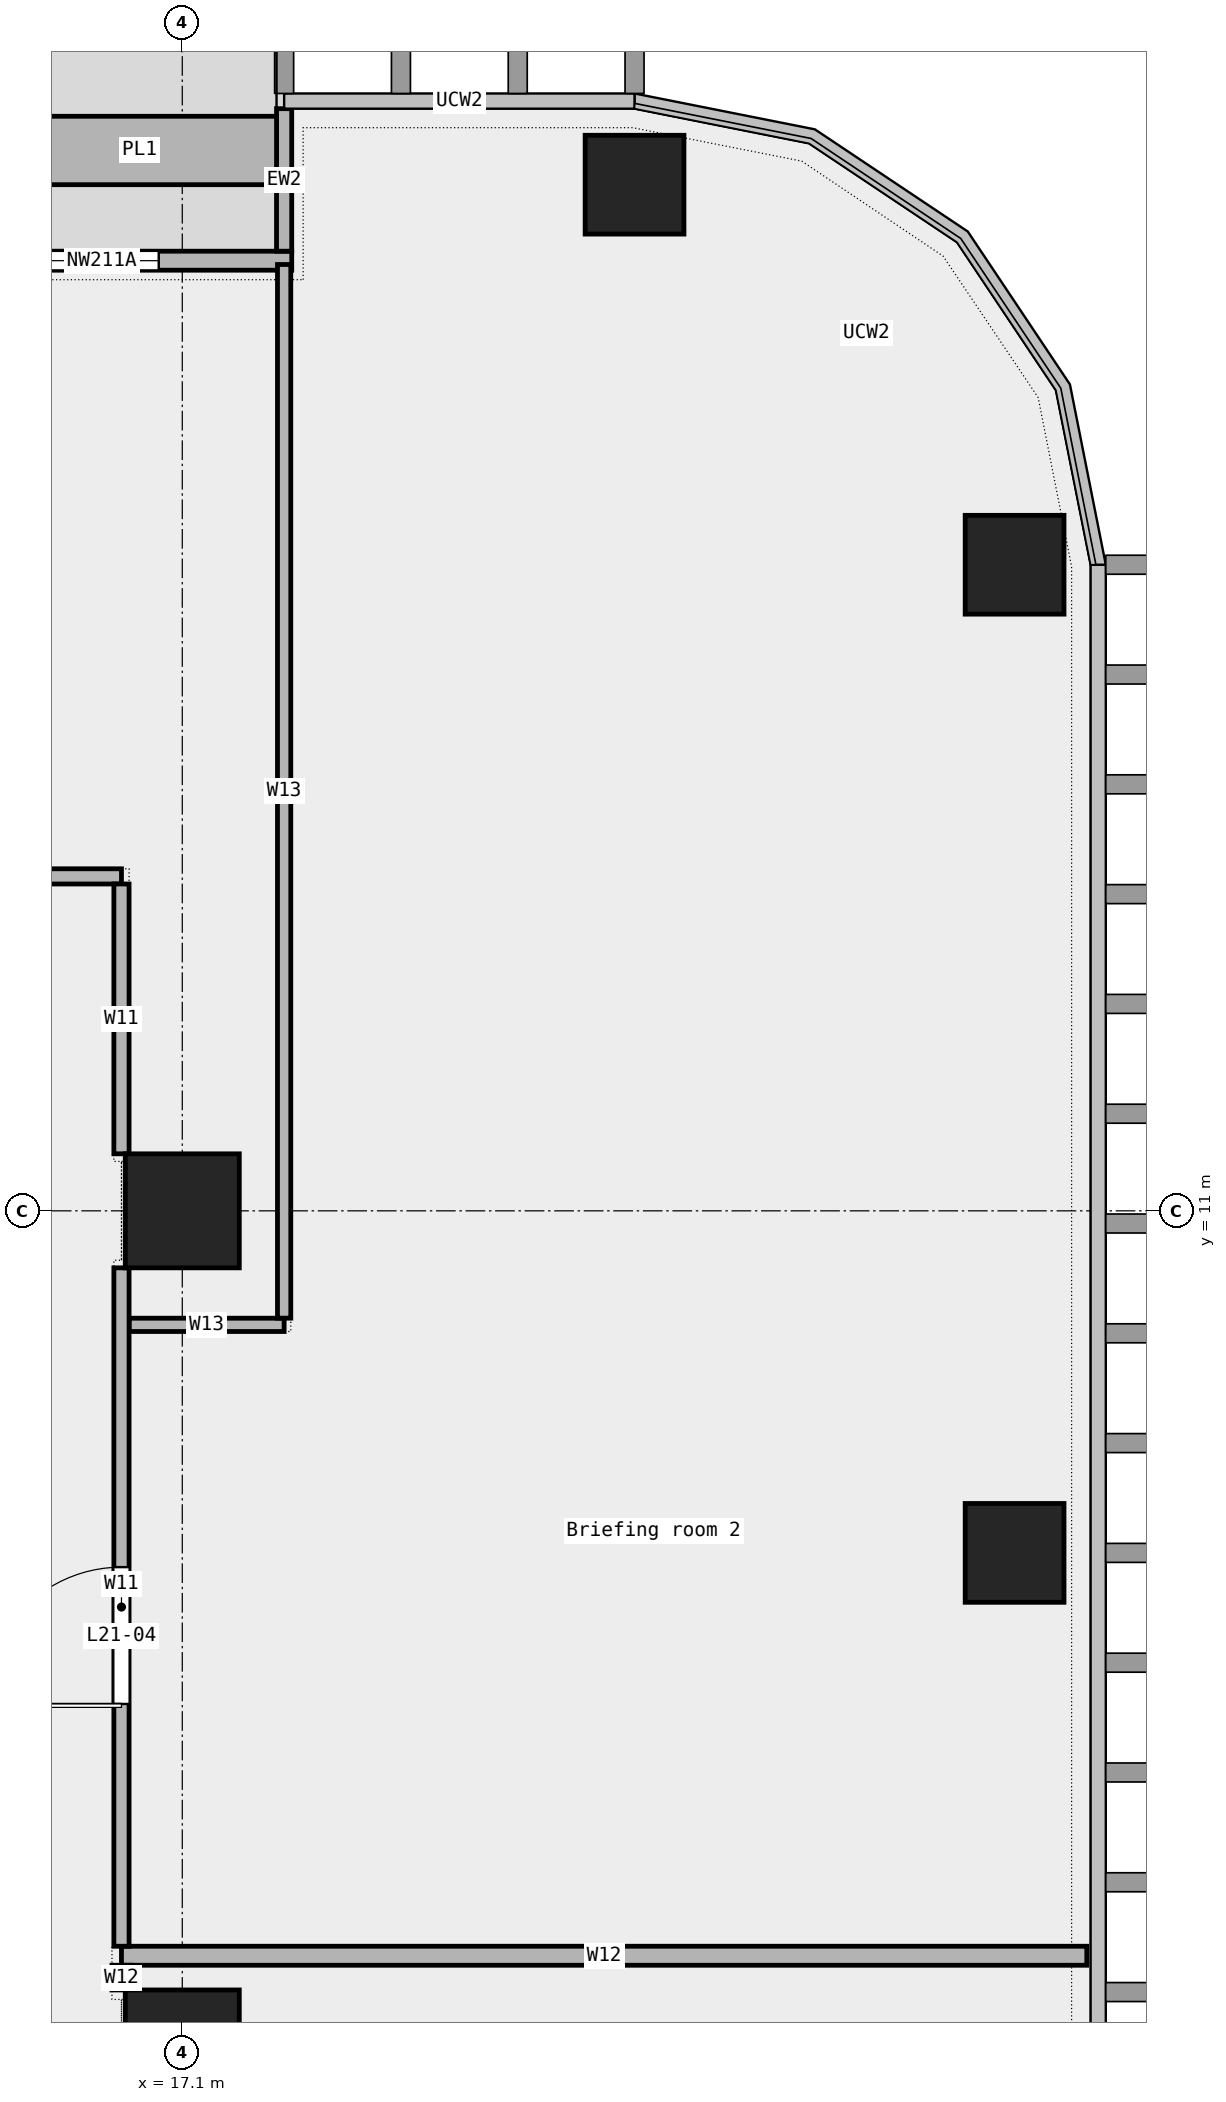
"""IFC4 building model, lengths in metres.
Left out: names, types, materials, properties, quantities, classifications, styles, units other than length and angle.
Written with IfcOpenShell. Run it as: python <this file> out.ifc"""

import sys

from ifc_helpers import new_model, si_unit, direction, frame, frame_2d, origin, origin_2d, place, context, subcontext, project, spatial, rectangle, extrude, element, fill, save


model = new_model("IFC4")
c1 = context("Model", 3, precision=1e-05, world=origin(), true_north=direction((0.0, 1.0)))
c2 = subcontext(c1, "Body", "Model", "MODEL_VIEW")
j1 = project(units=[si_unit("LENGTHUNIT", "METRE"), si_unit("PLANEANGLEUNIT", "RADIAN")], contexts=[c1])
p1 = place(None, origin())
s1 = spatial("IfcSite", under=j1, at=p1, CompositionType="ELEMENT")
p2 = place(p1, origin())
s2 = spatial("IfcBuilding", under=s1, at=p2, CompositionType="ELEMENT")
p3 = place(p2, frame((0.0, 0.0, 108.1)))
s3 = spatial("IfcBuildingStorey", under=s2, at=p3, CompositionType="ELEMENT", Elevation=108.1)
for number, where, z_axis, x_axis in (
    (1, (28.05, 6.5, 0.0), (0.0, 0.0, 1.0), (1.0, 0.0, 0.0)),
    (2, (28.05, 19.5, 0.0), (0.0, 0.0, 1.0), (1.0, 0.0, 0.0)),
    (3, (23.05, 24.5, 0.0), (0.0, 0.0, 1.0), (1.0, 0.0, 0.0)),
):
    element("IfcColumn", number, at=place(p3, frame(where, z_axis=z_axis, x_axis=x_axis)), inside=s3, PredefinedType="COLUMN", context=c2, shape_type="SweptSolid", body=[
        extrude(rectangle(XDim=1.3, YDim=1.3, at=origin_2d()), origin(), (0.0, 0.0, 1.0), 4.05),
    ])
for number, where, z_axis, x_axis in (
    (4, (17.1, 0.0, 0.0), (0.0, 0.0, 1.0), (1.0, 0.0, 0.0)),
    (5, (17.1, 11.0, 0.0), (0.0, 0.0, 1.0), (1.0, 0.0, 0.0)),
):
    element("IfcColumn", number, at=place(p3, frame(where, z_axis=z_axis, x_axis=x_axis)), inside=s3, PredefinedType="COLUMN", context=c2, shape_type="SweptSolid", body=[
        extrude(rectangle(XDim=1.5, YDim=1.5, at=origin_2d()), origin(), (0.0, 0.0, 1.0), 4.05),
    ])
p4 = place(p3, frame((18.54, 23.5, 0.0), z_axis=(0.0, 0.0, 1.0), x_axis=(-1.0, 0.0, 0.0)))
e6 = element("IfcWall", 6, at=p4, inside=s3, PredefinedType="STANDARD", context=c2, shape_type="SweptSolid", body=[
    extrude(rectangle(XDim=14.03, YDim=0.25, at=frame_2d((7.015, 0.0))), origin(), (0.0, 0.0, 1.0), 4.05),
])
p5 = place(p4, frame((1.75, 0.0, 0.45)))
e7 = element("IfcOpeningElement", 7, at=p5, cuts=e6, PredefinedType="OPENING", context=c2, shape_type="SweptSolid", body=[
    extrude(rectangle(XDim=1.5, YDim=3.0, at=frame_2d((0.75, 1.5))), frame((0.0, 0.137, 0.0), z_axis=(0.0, -1.0, 0.0), x_axis=(1.0, 0.0, 0.0)), (0.0, 0.0, 1.0), 0.274),
])
p6 = place(p4, frame((4.25, 0.0, 0.0)))
e8 = element("IfcOpeningElement", 8, at=p6, cuts=e6, PredefinedType="OPENING", context=c2, shape_type="SweptSolid", body=[
    extrude(rectangle(XDim=1.8, YDim=2.4, at=frame_2d((0.9, 1.2))), frame((0.0, 0.137, 0.0), z_axis=(0.0, -1.0, 0.0), x_axis=(1.0, 0.0, 0.0)), (0.0, 0.0, 1.0), 0.274),
])
p7 = place(p4, frame((10.75, 0.0, 0.45)))
e9 = element("IfcOpeningElement", 9, at=p7, cuts=e6, PredefinedType="OPENING", context=c2, shape_type="SweptSolid", body=[
    extrude(rectangle(XDim=1.5, YDim=3.0, at=frame_2d((0.75, 1.5))), frame((0.0, 0.137, 0.0), z_axis=(0.0, -1.0, 0.0), x_axis=(1.0, 0.0, 0.0)), (0.0, 0.0, 1.0), 0.274),
])
p8 = place(p3, frame((18.44, 25.5, 0.0), z_axis=(0.0, 0.0, 1.0), x_axis=(0.0, -1.0, 0.0)))
e10 = element("IfcWall", 10, at=p8, inside=s3, PredefinedType="STANDARD", context=c2, shape_type="SweptSolid", body=[
    extrude(rectangle(XDim=1.875, YDim=0.2, at=frame_2d((0.938, 0.0))), origin(), (0.0, 0.0, 1.0), 4.05),
])
p9 = place(p3, frame((18.34, 24.95, 0.0), z_axis=(0.0, 0.0, 1.0), x_axis=(-1.0, 0.0, 0.0)))
e11 = element("IfcWall", 11, at=p9, inside=s3, PredefinedType="STANDARD", context=c2, shape_type="SweptSolid", body=[
    extrude(rectangle(XDim=3.6, YDim=0.9, at=frame_2d((1.8, 0.0))), origin(), (0.0, 0.0, 1.0), 0.7),
])
p10 = place(p3, frame((16.3, 1.2, 0.0), z_axis=(0.0, 0.0, 1.0), x_axis=(1.0, 0.0, 0.0)))
e12 = element("IfcWall", 12, at=p10, inside=s3, PredefinedType="PARTITIONING", context=c2, shape_type="SweptSolid", body=[
    extrude(rectangle(XDim=12.7, YDim=0.25, at=frame_2d((6.35, 0.0))), origin(), (0.0, 0.0, 1.0), 4.05),
])
p11 = place(p3, frame((16.4, 9.5, 0.0), z_axis=(0.0, 0.0, 1.0), x_axis=(1.0, 0.0, 0.0)))
e13 = element("IfcWall", 13, at=p11, inside=s3, PredefinedType="PARTITIONING", context=c2, shape_type="SweptSolid", body=[
    extrude(rectangle(XDim=2.04, YDim=0.175, at=frame_2d((1.02, 0.0))), origin(), (0.0, 0.0, 1.0), 4.05),
])
p12 = place(p3, frame((4.61, 15.4, 0.0), z_axis=(0.0, 0.0, 1.0), x_axis=(1.0, 0.0, 0.0)))
e14 = element("IfcWall", 14, at=p12, inside=s3, PredefinedType="PARTITIONING", context=c2, shape_type="SweptSolid", body=[
    extrude(rectangle(XDim=11.69, YDim=0.2, at=frame_2d((5.845, 0.0))), origin(), (0.0, 0.0, 1.0), 4.05),
])
p13 = place(p12, frame((5.095, 0.0, 0.0)))
e15 = element("IfcOpeningElement", 15, at=p13, cuts=e14, PredefinedType="OPENING", context=c2, shape_type="SweptSolid", body=[
    extrude(rectangle(XDim=1.5, YDim=2.1, at=frame_2d((0.75, 1.05))), frame((0.0, 0.112, 0.0), z_axis=(0.0, -1.0, 0.0), x_axis=(1.0, 0.0, 0.0)), (0.0, 0.0, 1.0), 0.224),
])
p14 = place(p3, frame((16.3, 1.325, 0.0), z_axis=(0.0, 0.0, 1.0), x_axis=(0.0, 1.0, 0.0)))
e16 = element("IfcWall", 16, at=p14, inside=s3, PredefinedType="PARTITIONING", context=c2, shape_type="SweptSolid", body=[
    extrude(rectangle(XDim=8.925, YDim=0.2, at=frame_2d((4.462, 0.0))), origin(), (0.0, 0.0, 1.0), 4.05),
])
p15 = place(p14, frame((3.188, 0.0, 0.0)))
e17 = element("IfcOpeningElement", 17, at=p15, cuts=e16, PredefinedType="OPENING", context=c2, shape_type="SweptSolid", body=[
    extrude(rectangle(XDim=1.8, YDim=2.1, at=frame_2d((0.9, 1.05))), frame((0.0, 0.112, 0.0), z_axis=(0.0, -1.0, 0.0), x_axis=(1.0, 0.0, 0.0)), (0.0, 0.0, 1.0), 0.224),
])
p16 = place(p3, frame((16.3, 11.75, 0.0), z_axis=(0.0, 0.0, 1.0), x_axis=(0.0, 1.0, 0.0)))
e18 = element("IfcWall", 18, at=p16, inside=s3, PredefinedType="PARTITIONING", context=c2, shape_type="SweptSolid", body=[
    extrude(rectangle(XDim=3.55, YDim=0.2, at=frame_2d((1.775, 0.0))), origin(), (0.0, 0.0, 1.0), 4.05),
])
p17 = place(p3, frame((16.3, 0.75, 0.0), z_axis=(0.0, 0.0, 1.0), x_axis=(0.0, 1.0, 0.0)))
e19 = element("IfcWall", 19, at=p17, inside=s3, PredefinedType="PARTITIONING", context=c2, shape_type="SweptSolid", body=[
    extrude(rectangle(XDim=0.325, YDim=0.25, at=frame_2d((0.163, 0.0))), origin(), (0.0, 0.0, 1.0), 4.05),
])
p18 = place(p3, frame((18.44, 9.588, 0.0), z_axis=(0.0, 0.0, 1.0), x_axis=(0.0, 1.0, 0.0)))
e20 = element("IfcWall", 20, at=p18, inside=s3, PredefinedType="PARTITIONING", context=c2, shape_type="SweptSolid", body=[
    extrude(rectangle(XDim=13.862, YDim=0.175, at=frame_2d((6.931, 0.0))), origin(), (0.0, 0.0, 1.0), 4.05),
])
p19 = place(p5, origin())
e21 = element("IfcWindow", 21, at=p19, inside=s3, PartitioningType="SINGLE_PANEL", PredefinedType="WINDOW", context=c2, shape_type="SweptSolid", body=[
    extrude(rectangle(XDim=1.5, YDim=3.0, at=frame_2d((0.75, 1.5))), frame((0.0, 0.03, 0.0), z_axis=(0.0, -1.0, 0.0), x_axis=(1.0, 0.0, 0.0)), (0.0, 0.0, 1.0), 0.06),
])
fill(e7, e21)
p20 = place(p15, origin())
e22 = element("IfcDoor", 22, at=p20, inside=s3, OperationType="DOUBLE_DOOR_SINGLE_SWING", PredefinedType="DOOR", context=c2, shape_type="SweptSolid", body=[
    extrude(rectangle(XDim=1.8, YDim=2.1, at=frame_2d((0.9, 1.05))), frame((0.0, 0.025, 0.0), z_axis=(0.0, -1.0, 0.0), x_axis=(1.0, 0.0, 0.0)), (0.0, 0.0, 1.0), 0.05),
])
fill(e17, e22)
save(model, sys.argv[1])
